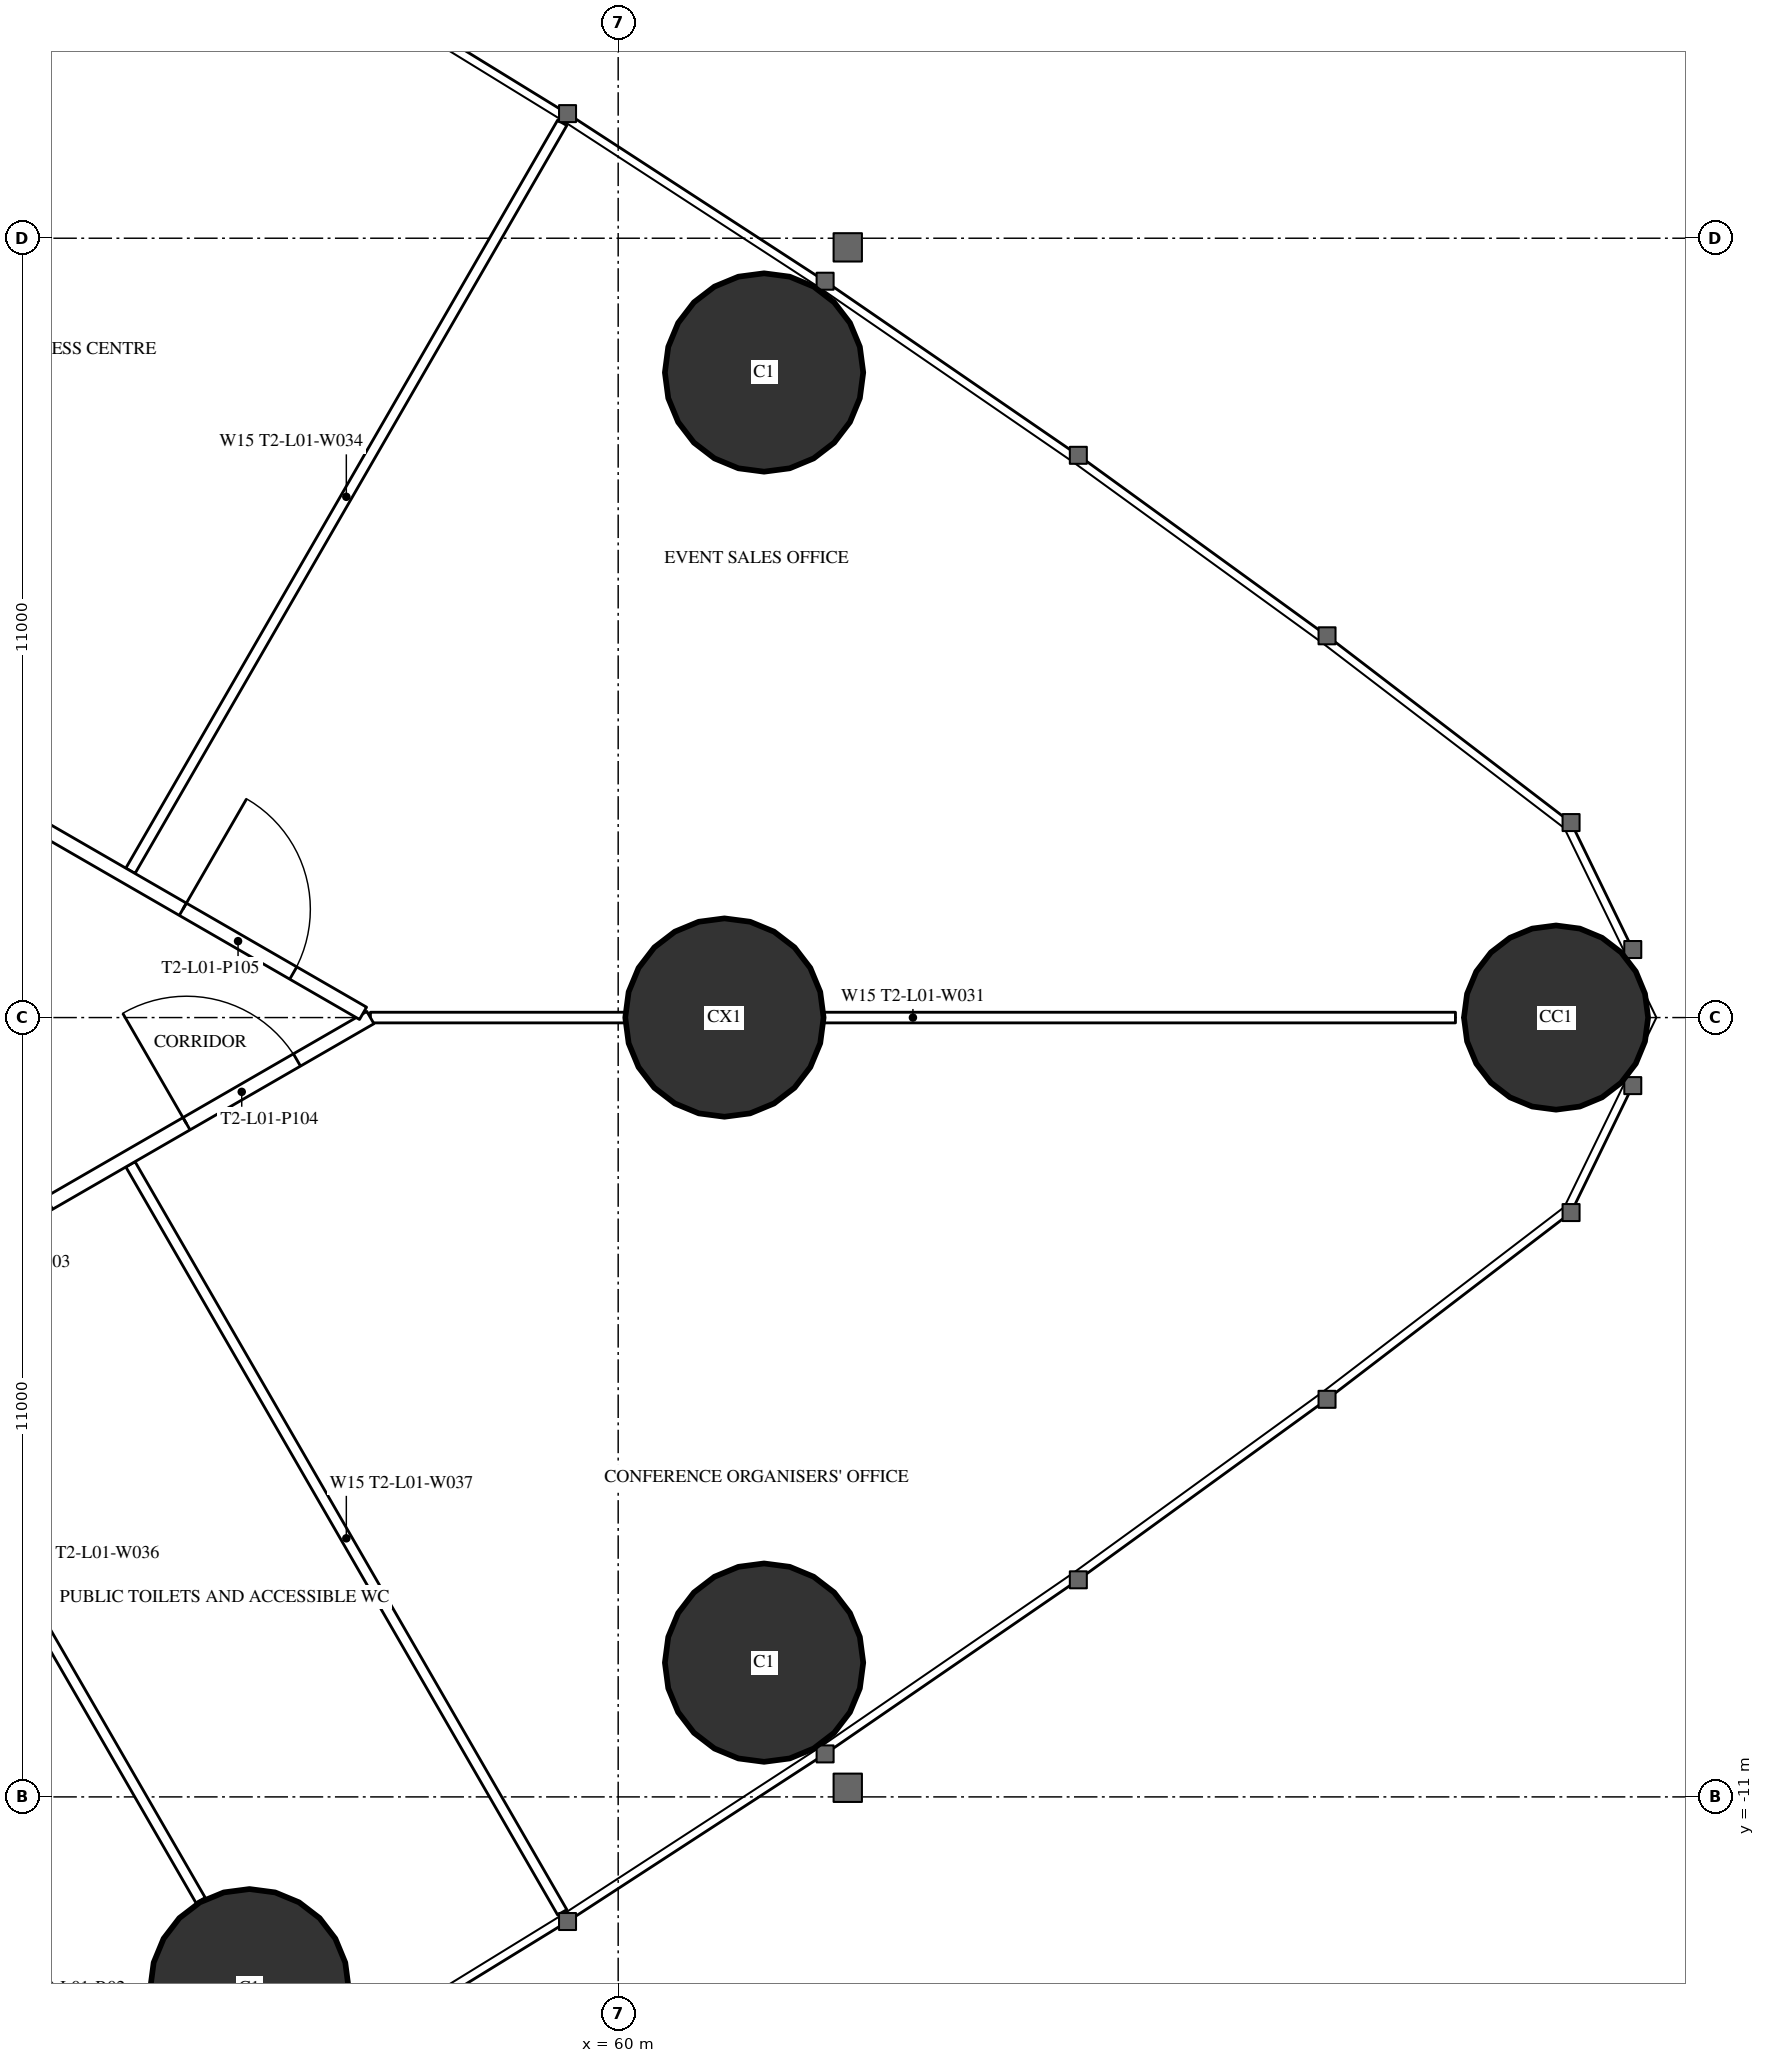
"""IFC4 building model, lengths in metres.
Left out: names, types, materials, properties, quantities, classifications, styles, units other than length and angle.
Written with IfcOpenShell. Run it as: python <this file> out.ifc"""

import sys

from ifc_helpers import new_model, si_unit, direction, frame, frame_2d, origin, origin_2d, place, context, subcontext, project, spatial, rectangle, hollow_circle, extrude, element, fill, save


model = new_model("IFC4")
c1 = context("Model", 3, precision=1e-05, world=origin(), true_north=direction((0.0, 1.0)))
c2 = subcontext(c1, "Body", "Model", "MODEL_VIEW")
j1 = project(units=[si_unit("LENGTHUNIT", "METRE"), si_unit("PLANEANGLEUNIT", "RADIAN")], contexts=[c1])
p1 = place(None, origin())
s1 = spatial("IfcSite", under=j1, at=p1, CompositionType="ELEMENT")
p2 = place(p1, origin())
s2 = spatial("IfcBuilding", under=s1, at=p2, CompositionType="ELEMENT")
p3 = place(p2, frame((0.0, 0.0, 7.2)))
s3 = spatial("IfcBuildingStorey", under=s2, at=p3, CompositionType="ELEMENT", Elevation=7.2)
p4 = place(p3, frame((73.239, 0.0, 0.0), z_axis=(0.0, 0.0, 1.0), x_axis=(1.0, 0.0, 0.0)))
e1 = element("IfcColumn", 1, at=p4, inside=s3, PredefinedType="COLUMN", context=c2, shape_type="SweptSolid", body=[
    extrude(hollow_circle(Radius=1.3, WallThickness=0.1, at=origin_2d()), origin(), (0.0, 0.0, 1.0), 5.4),
])
for number, where, z_axis, x_axis in (
    (2, (62.059, 9.105, 0.0), (0.0, 0.0, 1.0), (1.0, 0.0, 0.0)),
    (3, (54.795, -13.701, 0.0), (0.0, 0.0, 1.0), (1.0, 0.0, 0.0)),
    (4, (62.059, -9.105, 0.0), (0.0, 0.0, 1.0), (1.0, 0.0, 0.0)),
):
    element("IfcColumn", number, at=place(p3, frame(where, z_axis=z_axis, x_axis=x_axis)), inside=s3, PredefinedType="COLUMN", context=c2, shape_type="SweptSolid", body=[
        extrude(hollow_circle(Radius=1.4, WallThickness=0.12, at=origin_2d()), origin(), (0.0, 0.0, 1.0), 5.4),
    ])
p5 = place(p3, frame((61.5, 0.0, 0.0), z_axis=(0.0, 0.0, 1.0), x_axis=(1.0, 0.0, 0.0)))
e5 = element("IfcColumn", 5, at=p5, inside=s3, PredefinedType="COLUMN", context=c2, shape_type="SweptSolid", body=[
    extrude(hollow_circle(Radius=1.4, WallThickness=0.1, at=origin_2d()), origin(), (0.0, 0.0, 1.0), 5.4),
])
p6 = place(p3, frame((49.36, -4.239, 0.0), z_axis=(0.0, 0.0, 1.0), x_axis=(0.499984446848, -0.866034383215, 0.0)))
e6 = element("IfcWall", 6, at=p6, inside=s3, PredefinedType="PARTITIONING", context=c2, shape_type="SweptSolid", body=[
    extrude(rectangle(XDim=9.491, YDim=0.15, at=frame_2d((4.746, 0.0))), origin(), (0.0, 0.0, 1.0), 4.05),
])
for number, where, z_axis, x_axis in (
    (7, (53.115, -2.071, 0.0), (0.0, 0.0, 1.0), (0.5, -0.866, 0.0)),
    (8, (53.115, 2.071, 0.0), (0.0, 0.0, 1.0), (0.5, 0.866, 0.0)),
):
    element("IfcWall", number, at=place(p3, frame(where, z_axis=z_axis, x_axis=x_axis)), inside=s3, PredefinedType="PARTITIONING", context=c2, shape_type="SweptSolid", body=[
        extrude(rectangle(XDim=12.191, YDim=0.15, at=frame_2d((6.095, 0.0))), origin(), (0.0, 0.0, 1.0), 5.05),
    ])
p7 = place(p3, frame((56.502, 0.0, 0.0), z_axis=(0.0, 0.0, 1.0), x_axis=(1.0, 0.0, 0.0)))
e9 = element("IfcWall", 9, at=p7, inside=s3, PredefinedType="PARTITIONING", context=c2, shape_type="SweptSolid", body=[
    extrude(rectangle(XDim=15.317, YDim=0.15, at=frame_2d((7.658, 0.0))), origin(), (0.0, 0.0, 1.0), 4.05),
])
p8 = place(p3, frame((38.16, -10.59, 0.0), z_axis=(0.0, 0.0, 1.0), x_axis=(0.866027029586, 0.499997184019, 0.0)))
e10 = element("IfcWall", 10, at=p8, inside=s3, PredefinedType="PARTITIONING", context=c2, shape_type="SweptSolid", body=[
    extrude(rectangle(XDim=21.18, YDim=0.2, at=frame_2d((10.59, 0.0))), origin(), (0.0, 0.0, 1.0), 5.05),
])
p9 = place(p8, frame((14.142, 0.0, 0.0)))
e11 = element("IfcOpeningElement", 11, at=p9, cuts=e10, PredefinedType="OPENING", context=c2, shape_type="SweptSolid", body=[
    extrude(rectangle(XDim=1.8, YDim=2.2, at=frame_2d((0.9, 1.1))), frame((0.0, 0.11, 0.0), z_axis=(0.0, -1.0, 0.0), x_axis=(1.0, 0.0, 0.0)), (0.0, 0.0, 1.0), 0.22),
])
p10 = place(p8, frame((18.183, 0.0, 0.0)))
e12 = element("IfcOpeningElement", 12, at=p10, cuts=e10, PredefinedType="OPENING", context=c2, shape_type="SweptSolid", body=[
    extrude(rectangle(XDim=1.8, YDim=2.2, at=frame_2d((0.9, 1.1))), frame((0.0, 0.11, 0.0), z_axis=(0.0, -1.0, 0.0), x_axis=(1.0, 0.0, 0.0)), (0.0, 0.0, 1.0), 0.22),
])
p11 = place(p8, frame((5.65, 0.0, 0.0)))
e13 = element("IfcOpeningElement", 13, at=p11, cuts=e10, PredefinedType="OPENING", context=c2, shape_type="SweptSolid", body=[
    extrude(rectangle(XDim=1.8, YDim=2.2, at=frame_2d((0.9, 1.1))), frame((0.0, 0.11, 0.0), z_axis=(0.0, -1.0, 0.0), x_axis=(1.0, 0.0, 0.0)), (0.0, 0.0, 1.0), 0.22),
])
p12 = place(p3, frame((37.034, 11.24, 0.0), z_axis=(0.0, 0.0, 1.0), x_axis=(0.866025942536, -0.499999066854, 0.0)))
e14 = element("IfcWall", 14, at=p12, inside=s3, PredefinedType="PARTITIONING", context=c2, shape_type="SweptSolid", body=[
    extrude(rectangle(XDim=22.36, YDim=0.2, at=frame_2d((11.18, 0.0))), origin(), (0.0, 0.0, 1.0), 5.05),
])
p13 = place(p12, frame((19.423, 0.0, 0.0)))
e15 = element("IfcOpeningElement", 15, at=p13, cuts=e14, PredefinedType="OPENING", context=c2, shape_type="SweptSolid", body=[
    extrude(rectangle(XDim=1.8, YDim=2.2, at=frame_2d((0.9, 1.1))), frame((0.0, 0.11, 0.0), z_axis=(0.0, -1.0, 0.0), x_axis=(1.0, 0.0, 0.0)), (0.0, 0.0, 1.0), 0.22),
])
p14 = place(p12, frame((13.274, 0.0, 0.0)))
e16 = element("IfcOpeningElement", 16, at=p14, cuts=e14, PredefinedType="OPENING", context=c2, shape_type="SweptSolid", body=[
    extrude(rectangle(XDim=1.8, YDim=2.2, at=frame_2d((0.9, 1.1))), frame((0.0, 0.11, 0.0), z_axis=(0.0, -1.0, 0.0), x_axis=(1.0, 0.0, 0.0)), (0.0, 0.0, 1.0), 0.22),
])
p15 = place(p12, frame((4.602, 0.0, 0.0)))
e17 = element("IfcOpeningElement", 17, at=p15, cuts=e14, PredefinedType="OPENING", context=c2, shape_type="SweptSolid", body=[
    extrude(rectangle(XDim=1.8, YDim=2.2, at=frame_2d((0.9, 1.1))), frame((0.0, 0.11, 0.0), z_axis=(0.0, -1.0, 0.0), x_axis=(1.0, 0.0, 0.0)), (0.0, 0.0, 1.0), 0.22),
])
p16 = place(p10, origin())
e18 = element("IfcDoor", 18, at=p16, inside=s3, OperationType="DOUBLE_DOOR_SINGLE_SWING", PredefinedType="DOOR", context=c2, shape_type="SweptSolid", body=[
    extrude(rectangle(XDim=1.8, YDim=2.2, at=frame_2d((0.9, 1.1))), frame((0.0, 0.025, 0.0), z_axis=(0.0, -1.0, 0.0), x_axis=(1.0, 0.0, 0.0)), (0.0, 0.0, 1.0), 0.05),
])
fill(e12, e18)
p17 = place(p13, origin())
e19 = element("IfcDoor", 19, at=p17, inside=s3, OperationType="DOUBLE_DOOR_SINGLE_SWING", PredefinedType="DOOR", context=c2, shape_type="SweptSolid", body=[
    extrude(rectangle(XDim=1.8, YDim=2.2, at=frame_2d((0.9, 1.1))), frame((0.0, 0.025, 0.0), z_axis=(0.0, -1.0, 0.0), x_axis=(1.0, 0.0, 0.0)), (0.0, 0.0, 1.0), 0.05),
])
fill(e15, e19)
save(model, sys.argv[1])
